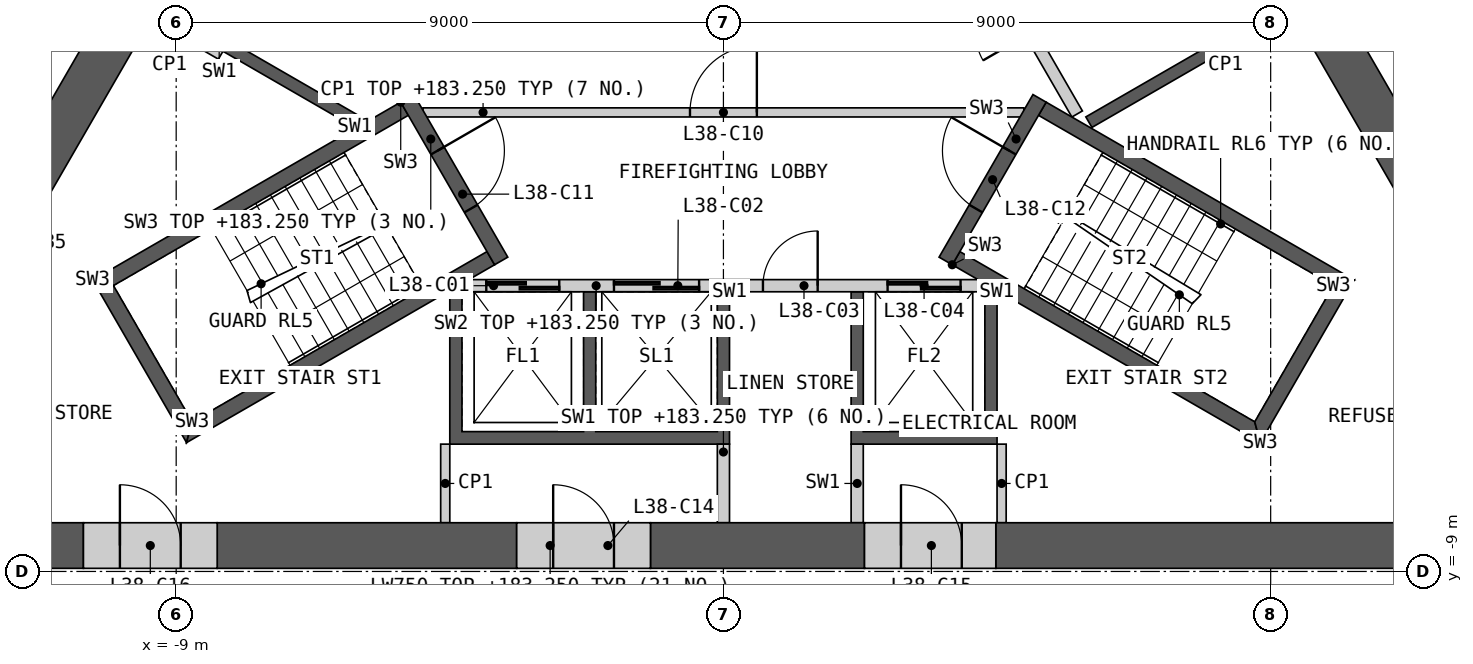
"""IFC4 building model, lengths in metres.
Left out: names, types, materials, properties, quantities, classifications, styles, units other than length and angle.
Written with IfcOpenShell. Run it as: python <this file> out.ifc"""

import sys

from ifc_helpers import new_model, si_unit, direction, frame, frame_2d, origin, place, context, subcontext, project, spatial, polyline, rectangle, outline, extrude, element, fill, save


model = new_model("IFC4")
c1 = context("Model", 3, precision=1e-05, world=origin(), true_north=direction((0.0, 1.0)))
c2 = subcontext(c1, "Body", "Model", "MODEL_VIEW")
j1 = project(units=[si_unit("LENGTHUNIT", "METRE"), si_unit("PLANEANGLEUNIT", "RADIAN")], contexts=[c1])
p1 = place(None, origin())
s1 = spatial("IfcSite", under=j1, at=p1, CompositionType="ELEMENT")
p2 = place(p1, origin())
s2 = spatial("IfcBuilding", under=s1, at=p2, CompositionType="ELEMENT")
p3 = place(p2, frame((0.0, 0.0, 180.0)))
s3 = spatial("IfcBuildingStorey", under=s2, at=p3, CompositionType="ELEMENT", Elevation=180.0)
p4 = place(p3, origin())
e1 = element("IfcWall", 1, at=p4, inside=s3, PredefinedType="SHEAR", context=c2, shape_type="SweptSolid", body=[
    extrude(outline(polyline([(4.5, -4.4), (4.5, -6.906), (2.1, -6.906), (2.1, -4.4), (2.3, -4.4), (2.3, -6.7), (4.3, -6.7), (4.3, -4.4), (4.5, -4.4)])), origin(), (0.0, 0.0, 1.0), 3.25),
])
p5 = place(p3, origin())
e2 = element("IfcWall", 2, at=p5, inside=s3, PredefinedType="SHEAR", context=c2, shape_type="SweptSolid", body=[
    extrude(outline(polyline([(0.1, -4.4), (0.1, -6.906), (-4.5, -6.906), (-4.5, -4.4), (-4.3, -4.4), (-4.3, -6.7), (-2.3, -6.7), (-2.3, -4.4), (-2.1, -4.4), (-2.1, -6.7), (-0.1, -6.7), (-0.1, -4.4), (0.1, -4.4)])), origin(), (0.0, 0.0, 1.0), 3.25),
])
p6 = place(p3, frame((-4.187, -4.3, 0.0), z_axis=(0.0, 0.0, 1.0), x_axis=(1.0, 0.0, 0.0)))
e3 = element("IfcWall", 3, at=p6, inside=s3, PredefinedType="SOLIDWALL", context=c2, shape_type="SweptSolid", body=[
    extrude(rectangle(XDim=8.373, YDim=0.2, at=frame_2d((4.187, 0.0))), origin(), (0.0, 0.0, 1.0), 3.25),
])
p7 = place(p6, frame((0.287, 0.0, 0.0)))
e4 = element("IfcOpeningElement", 4, at=p7, cuts=e3, PredefinedType="OPENING", context=c2, shape_type="SweptSolid", body=[
    extrude(rectangle(XDim=1.2, YDim=2.1, at=frame_2d((0.6, 1.05))), frame((0.0, 0.11, 0.0), z_axis=(0.0, -1.0, 0.0), x_axis=(1.0, 0.0, 0.0)), (0.0, 0.0, 1.0), 0.22),
])
p8 = place(p6, frame((2.387, 0.0, 0.0)))
e5 = element("IfcOpeningElement", 5, at=p8, cuts=e3, PredefinedType="OPENING", context=c2, shape_type="SweptSolid", body=[
    extrude(rectangle(XDim=1.4, YDim=2.1, at=frame_2d((0.7, 1.05))), frame((0.0, 0.11, 0.0), z_axis=(0.0, -1.0, 0.0), x_axis=(1.0, 0.0, 0.0)), (0.0, 0.0, 1.0), 0.22),
])
p9 = place(p6, frame((4.837, 0.0, 0.0)))
e6 = element("IfcOpeningElement", 6, at=p9, cuts=e3, PredefinedType="OPENING", context=c2, shape_type="SweptSolid", body=[
    extrude(rectangle(XDim=0.9, YDim=2.1, at=frame_2d((0.45, 1.05))), frame((0.0, 0.11, 0.0), z_axis=(0.0, -1.0, 0.0), x_axis=(1.0, 0.0, 0.0)), (0.0, 0.0, 1.0), 0.22),
])
p10 = place(p6, frame((6.887, 0.0, 0.0)))
e7 = element("IfcOpeningElement", 7, at=p10, cuts=e3, PredefinedType="OPENING", context=c2, shape_type="SweptSolid", body=[
    extrude(rectangle(XDim=1.2, YDim=2.1, at=frame_2d((0.6, 1.05))), frame((0.0, 0.11, 0.0), z_axis=(0.0, -1.0, 0.0), x_axis=(1.0, 0.0, 0.0)), (0.0, 0.0, 1.0), 0.22),
])
for number, where, z_axis, x_axis in (
    (8, (0.0, -6.906, 0.0), (0.0, 0.0, 1.0), (0.0, -1.0, 0.0)),
    (9, (2.2, -6.906, 0.0), (0.0, 0.0, 1.0), (0.0, -1.0, 0.0)),
):
    element("IfcWall", number, at=place(p3, frame(where, z_axis=z_axis, x_axis=x_axis)), inside=s3, PredefinedType="SHEAR", context=c2, shape_type="SweptSolid", body=[
        extrude(rectangle(XDim=1.293, YDim=0.2, at=frame_2d((0.646, 0.0))), origin(), (0.0, 0.0, 1.0), 3.25),
    ])
p11 = place(p3, origin())
e10 = element("IfcWall", 10, at=p11, inside=s3, PredefinedType="SHEAR", context=c2, shape_type="SweptSolid", body=[
    extrude(outline(polyline([(3.76, 2.287), (5.931, 3.54), (8.231, -0.444), (6.061, -1.697), (5.96, -1.524), (7.952, -0.374), (5.852, 3.263), (3.861, 2.113), (3.76, 2.287)])), origin(), (0.0, 0.0, 1.0), 3.25),
])
p12 = place(p3, frame((5.817, -1.476, 0.0), z_axis=(0.0, 0.0, 1.0), x_axis=(-0.500002616675, 0.866023893041, 0.0)))
e11 = element("IfcWall", 11, at=p12, inside=s3, PredefinedType="SOLIDWALL", context=c2, shape_type="SweptSolid", body=[
    extrude(rectangle(XDim=8.373, YDim=0.2, at=frame_2d((4.187, 0.0))), origin(), (0.0, 0.0, 1.0), 3.25),
])
p13 = place(p12, frame((1.537, 0.0, 0.0)))
e12 = element("IfcOpeningElement", 12, at=p13, cuts=e11, PredefinedType="OPENING", context=c2, shape_type="SweptSolid", body=[
    extrude(rectangle(XDim=0.9, YDim=2.1, at=frame_2d((0.45, 1.05))), frame((0.0, 0.11, 0.0), z_axis=(0.0, -1.0, 0.0), x_axis=(1.0, 0.0, 0.0)), (0.0, 0.0, 1.0), 0.22),
])
p14 = place(p12, frame((4.837, 0.0, 0.0)))
e13 = element("IfcOpeningElement", 13, at=p14, cuts=e11, PredefinedType="OPENING", context=c2, shape_type="SweptSolid", body=[
    extrude(rectangle(XDim=0.9, YDim=2.1, at=frame_2d((0.45, 1.05))), frame((0.0, 0.11, 0.0), z_axis=(0.0, -1.0, 0.0), x_axis=(1.0, 0.0, 0.0)), (0.0, 0.0, 1.0), 0.22),
])
p15 = place(p12, frame((6.937, 0.0, 0.0)))
e14 = element("IfcOpeningElement", 14, at=p15, cuts=e11, PredefinedType="OPENING", context=c2, shape_type="SweptSolid", body=[
    extrude(rectangle(XDim=1.1, YDim=2.1, at=frame_2d((0.55, 1.05))), frame((0.0, 0.11, 0.0), z_axis=(0.0, -1.0, 0.0), x_axis=(1.0, 0.0, 0.0)), (0.0, 0.0, 1.0), 0.22),
])
p16 = place(p3, origin())
e15 = element("IfcWall", 15, at=p16, inside=s3, PredefinedType="SHEAR", context=c2, shape_type="SweptSolid", body=[
    extrude(outline(polyline([(-6.061, -1.697), (-8.231, -0.444), (-8.131, -0.271), (-5.96, -1.524), (-6.061, -1.697)])), origin(), (0.0, 0.0, 1.0), 3.25),
])
p17 = place(p3, frame((-4.941, -1.45, 0.0), z_axis=(0.0, 0.0, 1.0), x_axis=(1.0, 0.0, 0.0)))
e16 = element("IfcWall", 16, at=p17, inside=s3, PredefinedType="PARTITIONING", context=c2, shape_type="SweptSolid", body=[
    extrude(rectangle(XDim=9.882, YDim=0.15, at=frame_2d((4.941, 0.0))), origin(), (0.0, 0.0, 1.0), 3.25),
])
p18 = place(p17, frame((4.391, 0.0, 0.0)))
e17 = element("IfcOpeningElement", 17, at=p18, cuts=e16, PredefinedType="OPENING", context=c2, shape_type="SweptSolid", body=[
    extrude(rectangle(XDim=1.1, YDim=2.1, at=frame_2d((0.55, 1.05))), frame((0.0, 0.085, 0.0), z_axis=(0.0, -1.0, 0.0), x_axis=(1.0, 0.0, 0.0)), (0.0, 0.0, 1.0), 0.17),
])
p19 = place(p3, origin())
e18 = element("IfcWall", 18, at=p19, inside=s3, PredefinedType="SHEAR", context=c2, shape_type="SweptSolid", body=[
    extrude(outline(polyline([(-5.307, -1.281), (-10.374, -4.206), (-10.032, -4.298), (-5.182, -1.498), (-5.307, -1.281)])), origin(), (0.0, 0.0, 1.0), 3.25),
])
p20 = place(p3, origin())
e19 = element("IfcWall", 19, at=p20, inside=s3, PredefinedType="SHEAR", context=c2, shape_type="SweptSolid", body=[
    extrude(outline(polyline([(-10.374, -4.206), (-8.83, -6.881), (-8.738, -6.539), (-10.032, -4.298), (-10.374, -4.206)])), origin(), (0.0, 0.0, 1.0), 3.25),
])
p21 = place(p3, origin())
e20 = element("IfcWall", 20, at=p21, inside=s3, PredefinedType="SHEAR", context=c2, shape_type="SweptSolid", body=[
    extrude(outline(polyline([(-8.738, -6.539), (-8.83, -6.881), (-3.763, -3.956), (-3.888, -3.739), (-8.738, -6.539)])), origin(), (0.0, 0.0, 1.0), 3.25),
])
p22 = place(p3, frame((-5.199, -1.219, 0.0), z_axis=(0.0, 0.0, 1.0), x_axis=(0.499982516597, -0.866035497597, 0.0)))
e21 = element("IfcWall", 21, at=p22, inside=s3, PredefinedType="SHEAR", context=c2, shape_type="SweptSolid", body=[
    extrude(rectangle(XDim=3.088, YDim=0.25, at=frame_2d((1.544, 0.0))), origin(), (0.0, 0.0, 1.0), 3.25),
])
p23 = place(p22, frame((0.994, 0.0, 0.0)))
e22 = element("IfcOpeningElement", 22, at=p23, cuts=e21, PredefinedType="OPENING", context=c2, shape_type="SweptSolid", body=[
    extrude(rectangle(XDim=1.1, YDim=2.1, at=frame_2d((0.55, 1.05))), frame((0.0, 0.135, 0.0), z_axis=(0.0, -1.0, 0.0), x_axis=(1.0, 0.0, 0.0)), (0.0, 0.0, 1.0), 0.27),
])
p24 = place(p3, origin())
e23 = element("IfcWall", 23, at=p24, inside=s3, PredefinedType="SHEAR", context=c2, shape_type="SweptSolid", body=[
    extrude(outline(polyline([(3.763, -3.956), (8.83, -6.881), (8.738, -6.539), (3.888, -3.739), (3.763, -3.956)])), origin(), (0.0, 0.0, 1.0), 3.25),
])
p25 = place(p3, origin())
e24 = element("IfcWall", 24, at=p25, inside=s3, PredefinedType="SHEAR", context=c2, shape_type="SweptSolid", body=[
    extrude(outline(polyline([(8.83, -6.881), (10.374, -4.206), (10.032, -4.298), (8.738, -6.539), (8.83, -6.881)])), origin(), (0.0, 0.0, 1.0), 3.25),
])
p26 = place(p3, origin())
e25 = element("IfcWall", 25, at=p26, inside=s3, PredefinedType="SHEAR", context=c2, shape_type="SweptSolid", body=[
    extrude(outline(polyline([(10.032, -4.298), (10.374, -4.206), (5.307, -1.281), (5.182, -1.498), (10.032, -4.298)])), origin(), (0.0, 0.0, 1.0), 3.25),
])
p27 = place(p3, frame((3.655, -3.893, 0.0), z_axis=(0.0, 0.0, 1.0), x_axis=(0.499982516597, 0.866035497597, 0.0)))
e26 = element("IfcWall", 26, at=p27, inside=s3, PredefinedType="SHEAR", context=c2, shape_type="SweptSolid", body=[
    extrude(rectangle(XDim=3.088, YDim=0.25, at=frame_2d((1.544, 0.0))), origin(), (0.0, 0.0, 1.0), 3.25),
])
p28 = place(p27, frame((0.994, 0.0, 0.0)))
e27 = element("IfcOpeningElement", 27, at=p28, cuts=e26, PredefinedType="OPENING", context=c2, shape_type="SweptSolid", body=[
    extrude(rectangle(XDim=1.1, YDim=2.1, at=frame_2d((0.55, 1.05))), frame((0.0, 0.135, 0.0), z_axis=(0.0, -1.0, 0.0), x_axis=(1.0, 0.0, 0.0)), (0.0, 0.0, 1.0), 0.27),
])
for number, where, z_axis, x_axis in (
    (28, (4.575, -6.906, 0.0), (0.0, 0.0, 1.0), (0.0, -1.0, 0.0)),
    (29, (-4.575, -6.906, 0.0), (0.0, 0.0, 1.0), (0.0, -1.0, 0.0)),
    (30, (-8.268, -0.509, 0.0), (0.0, 0.0, 1.0), (-0.866, 0.5, 0.0)),
):
    element("IfcWall", number, at=place(p3, frame(where, z_axis=z_axis, x_axis=x_axis)), inside=s3, PredefinedType="PARTITIONING", context=c2, shape_type="SweptSolid", body=[
        extrude(rectangle(XDim=1.293, YDim=0.15, at=frame_2d((0.646, 0.0))), origin(), (0.0, 0.0, 1.0), 3.25),
    ])
p29 = place(p3, frame((4.48, -8.574, 0.0), z_axis=(0.0, 0.0, 1.0), x_axis=(1.0, 0.0, 0.0)))
e31 = element("IfcWall", 31, at=p29, inside=s3, PredefinedType="SHEAR", context=c2, shape_type="SweptSolid", body=[
    extrude(rectangle(XDim=9.721, YDim=0.75, at=frame_2d((4.86, 0.0))), origin(), (0.0, 0.0, 1.0), 3.25),
])
p30 = place(p3, frame((-8.325, -8.574, 0.0), z_axis=(0.0, 0.0, 1.0), x_axis=(1.0, 0.0, 0.0)))
e32 = element("IfcWall", 32, at=p30, inside=s3, PredefinedType="SHEAR", context=c2, shape_type="SweptSolid", body=[
    extrude(rectangle(XDim=4.926, YDim=0.75, at=frame_2d((2.463, 0.0))), origin(), (0.0, 0.0, 1.0), 3.25),
])
p31 = place(p3, frame((-14.201, -8.574, 0.0), z_axis=(0.0, 0.0, 1.0), x_axis=(1.0, 0.0, 0.0)))
e33 = element("IfcWall", 33, at=p31, inside=s3, PredefinedType="SHEAR", context=c2, shape_type="SweptSolid", body=[
    extrude(rectangle(XDim=3.676, YDim=0.75, at=frame_2d((1.838, 0.0))), origin(), (0.0, 0.0, 1.0), 3.25),
])
p32 = place(p3, frame((-1.2, -8.574, 0.0), z_axis=(0.0, 0.0, 1.0), x_axis=(1.0, 0.0, 0.0)))
e34 = element("IfcWall", 34, at=p32, inside=s3, PredefinedType="SHEAR", context=c2, shape_type="SweptSolid", body=[
    extrude(rectangle(XDim=3.52, YDim=0.75, at=frame_2d((1.76, 0.0))), origin(), (0.0, 0.0, 1.0), 3.25),
])
p33 = place(p3, frame((11.527, -2.817, 0.0), z_axis=(0.0, 0.0, 1.0), x_axis=(-0.50001992892, 0.866013897511, 0.0)))
e35 = element("IfcWall", 35, at=p33, inside=s3, PredefinedType="SHEAR", context=c2, shape_type="SweptSolid", body=[
    extrude(rectangle(XDim=4.926, YDim=0.75, at=frame_2d((2.463, 0.0))), origin(), (0.0, 0.0, 1.0), 3.25),
])
p34 = place(p3, frame((-9.625, 0.477, 0.0), z_axis=(0.0, 0.0, 1.0), x_axis=(-0.499986234705, -0.866033351035, 0.0)))
e36 = element("IfcWall", 36, at=p34, inside=s3, PredefinedType="SHEAR", context=c2, shape_type="SweptSolid", body=[
    extrude(rectangle(XDim=9.801, YDim=0.75, at=frame_2d((4.9, 0.0))), origin(), (0.0, 0.0, 1.0), 3.25),
])
p35 = place(p3, frame((-3.4, -8.574, 0.0), z_axis=(0.0, 0.0, 1.0), x_axis=(1.0, 0.0, 0.0)))
e37 = element("IfcWall", 37, at=p35, inside=s3, PredefinedType="SHEAR", context=c2, shape_type="SweptSolid", body=[
    extrude(rectangle(XDim=2.2, YDim=0.75, at=frame_2d((1.1, 0.0))), origin(), (0.0, 0.0, 1.0), 3.25),
])
p36 = place(p35, frame((0.6, 0.0, 0.0)))
e38 = element("IfcOpeningElement", 38, at=p36, cuts=e37, PredefinedType="OPENING", context=c2, shape_type="SweptSolid", body=[
    extrude(rectangle(XDim=1.0, YDim=2.1, at=frame_2d((0.5, 1.05))), frame((0.0, 0.385, 0.0), z_axis=(0.0, -1.0, 0.0), x_axis=(1.0, 0.0, 0.0)), (0.0, 0.0, 1.0), 0.77),
])
p37 = place(p3, frame((2.32, -8.574, 0.0), z_axis=(0.0, 0.0, 1.0), x_axis=(1.0, 0.0, 0.0)))
e39 = element("IfcWall", 39, at=p37, inside=s3, PredefinedType="SHEAR", context=c2, shape_type="SweptSolid", body=[
    extrude(rectangle(XDim=2.16, YDim=0.75, at=frame_2d((1.08, 0.0))), origin(), (0.0, 0.0, 1.0), 3.25),
])
p38 = place(p37, frame((0.6, 0.0, 0.0)))
e40 = element("IfcOpeningElement", 40, at=p38, cuts=e39, PredefinedType="OPENING", context=c2, shape_type="SweptSolid", body=[
    extrude(rectangle(XDim=1.0, YDim=2.1, at=frame_2d((0.5, 1.05))), frame((0.0, 0.385, 0.0), z_axis=(0.0, -1.0, 0.0), x_axis=(1.0, 0.0, 0.0)), (0.0, 0.0, 1.0), 0.77),
])
p39 = place(p3, frame((-10.525, -8.574, 0.0), z_axis=(0.0, 0.0, 1.0), x_axis=(1.0, 0.0, 0.0)))
e41 = element("IfcWall", 41, at=p39, inside=s3, PredefinedType="SHEAR", context=c2, shape_type="SweptSolid", body=[
    extrude(rectangle(XDim=2.2, YDim=0.75, at=frame_2d((1.1, 0.0))), origin(), (0.0, 0.0, 1.0), 3.25),
])
p40 = place(p39, frame((0.6, 0.0, 0.0)))
e42 = element("IfcOpeningElement", 42, at=p40, cuts=e41, PredefinedType="OPENING", context=c2, shape_type="SweptSolid", body=[
    extrude(rectangle(XDim=1.0, YDim=2.1, at=frame_2d((0.5, 1.05))), frame((0.0, 0.385, 0.0), z_axis=(0.0, -1.0, 0.0), x_axis=(1.0, 0.0, 0.0)), (0.0, 0.0, 1.0), 0.77),
])
p41 = place(p3, frame((5.377, 19.385, 0.0), z_axis=(0.0, 0.0, 1.0), x_axis=(0.500000757641, -0.86602496636, 0.0)))
e43 = element("IfcWall", 43, at=p41, inside=s3, PredefinedType="PARTITIONING", context=c2, shape_type="SweptSolid", body=[
    extrude(rectangle(XDim=28.198, YDim=0.2, at=frame_2d((14.099, 0.0))), origin(), (0.0, 0.0, 1.0), 3.25),
])
p42 = place(p41, frame((22.735, 0.0, 0.0)))
e44 = element("IfcOpeningElement", 44, at=p42, cuts=e43, PredefinedType="OPENING", context=c2, shape_type="SweptSolid", body=[
    extrude(rectangle(XDim=1.8, YDim=2.1, at=frame_2d((0.9, 1.05))), frame((0.0, 0.11, 0.0), z_axis=(0.0, -1.0, 0.0), x_axis=(1.0, 0.0, 0.0)), (0.0, 0.0, 1.0), 0.22),
])
p43 = place(p41, frame((14.402, 0.0, 0.0)))
e45 = element("IfcOpeningElement", 45, at=p43, cuts=e43, PredefinedType="OPENING", context=c2, shape_type="SweptSolid", body=[
    extrude(rectangle(XDim=1.0, YDim=2.1, at=frame_2d((0.5, 1.05))), frame((0.0, 0.11, 0.0), z_axis=(0.0, -1.0, 0.0), x_axis=(1.0, 0.0, 0.0)), (0.0, 0.0, 1.0), 0.22),
])
p44 = place(p41, frame((12.796, 0.0, 0.0)))
e46 = element("IfcOpeningElement", 46, at=p44, cuts=e43, PredefinedType="OPENING", context=c2, shape_type="SweptSolid", body=[
    extrude(rectangle(XDim=1.0, YDim=2.1, at=frame_2d((0.5, 1.05))), frame((0.0, 0.11, 0.0), z_axis=(0.0, -1.0, 0.0), x_axis=(1.0, 0.0, 0.0)), (0.0, 0.0, 1.0), 0.22),
])
p45 = place(p41, frame((4.164, 0.0, 0.0)))
e47 = element("IfcOpeningElement", 47, at=p45, cuts=e43, PredefinedType="OPENING", context=c2, shape_type="SweptSolid", body=[
    extrude(rectangle(XDim=1.0, YDim=2.1, at=frame_2d((0.5, 1.05))), frame((0.0, 0.11, 0.0), z_axis=(0.0, -1.0, 0.0), x_axis=(1.0, 0.0, 0.0)), (0.0, 0.0, 1.0), 0.22),
])
p46 = place(p41, frame((1.452, 0.0, 0.0)))
e48 = element("IfcOpeningElement", 48, at=p46, cuts=e43, PredefinedType="OPENING", context=c2, shape_type="SweptSolid", body=[
    extrude(rectangle(XDim=0.95, YDim=2.1, at=frame_2d((0.475, 1.05))), frame((0.0, 0.11, 0.0), z_axis=(0.0, -1.0, 0.0), x_axis=(1.0, 0.0, 0.0)), (0.0, 0.0, 1.0), 0.22),
])
p47 = place(p3, frame((-14.619, -2.624, 0.0), z_axis=(0.0, 0.0, 1.0), x_axis=(0.50000393355, 0.866023132736, 0.0)))
e49 = element("IfcWall", 49, at=p47, inside=s3, PredefinedType="PARTITIONING", context=c2, shape_type="SweptSolid", body=[
    extrude(rectangle(XDim=9.335, YDim=0.2, at=frame_2d((4.667, 0.0))), origin(), (0.0, 0.0, 1.0), 3.25),
])
p48 = place(p47, frame((4.77, 0.0, 0.0)))
e50 = element("IfcOpeningElement", 50, at=p48, cuts=e49, PredefinedType="OPENING", context=c2, shape_type="SweptSolid", body=[
    extrude(rectangle(XDim=1.0, YDim=2.1, at=frame_2d((0.5, 1.05))), frame((0.0, 0.11, 0.0), z_axis=(0.0, -1.0, 0.0), x_axis=(1.0, 0.0, 0.0)), (0.0, 0.0, 1.0), 0.22),
])
p49 = place(p47, frame((3.163, 0.0, 0.0)))
e51 = element("IfcOpeningElement", 51, at=p49, cuts=e49, PredefinedType="OPENING", context=c2, shape_type="SweptSolid", body=[
    extrude(rectangle(XDim=1.0, YDim=2.1, at=frame_2d((0.5, 1.05))), frame((0.0, 0.11, 0.0), z_axis=(0.0, -1.0, 0.0), x_axis=(1.0, 0.0, 0.0)), (0.0, 0.0, 1.0), 0.22),
])
p50 = place(p7, origin())
e52 = element("IfcDoor", 52, at=p50, inside=s3, OperationType="SLIDING_TO_LEFT", PredefinedType="DOOR", context=c2, shape_type="SweptSolid", body=[
    extrude(rectangle(XDim=1.2, YDim=2.1, at=frame_2d((0.6, 1.05))), frame((0.0, 0.025, 0.0), z_axis=(0.0, -1.0, 0.0), x_axis=(1.0, 0.0, 0.0)), (0.0, 0.0, 1.0), 0.05),
])
fill(e4, e52)
p51 = place(p8, origin())
e53 = element("IfcDoor", 53, at=p51, inside=s3, OperationType="SLIDING_TO_LEFT", PredefinedType="DOOR", context=c2, shape_type="SweptSolid", body=[
    extrude(rectangle(XDim=1.4, YDim=2.1, at=frame_2d((0.7, 1.05))), frame((0.0, 0.025, 0.0), z_axis=(0.0, -1.0, 0.0), x_axis=(1.0, 0.0, 0.0)), (0.0, 0.0, 1.0), 0.05),
])
fill(e5, e53)
p52 = place(p9, origin())
e54 = element("IfcDoor", 54, at=p52, inside=s3, OperationType="SINGLE_SWING_RIGHT", PredefinedType="DOOR", context=c2, shape_type="SweptSolid", body=[
    extrude(rectangle(XDim=0.9, YDim=2.1, at=frame_2d((0.45, 1.05))), frame((0.0, 0.025, 0.0), z_axis=(0.0, -1.0, 0.0), x_axis=(1.0, 0.0, 0.0)), (0.0, 0.0, 1.0), 0.05),
])
fill(e6, e54)
p53 = place(p10, origin())
e55 = element("IfcDoor", 55, at=p53, inside=s3, OperationType="SLIDING_TO_LEFT", PredefinedType="DOOR", context=c2, shape_type="SweptSolid", body=[
    extrude(rectangle(XDim=1.2, YDim=2.1, at=frame_2d((0.6, 1.05))), frame((0.0, 0.025, 0.0), z_axis=(0.0, -1.0, 0.0), x_axis=(1.0, 0.0, 0.0)), (0.0, 0.0, 1.0), 0.05),
])
fill(e7, e55)
p54 = place(p18, origin())
e56 = element("IfcDoor", 56, at=p54, inside=s3, OperationType="SINGLE_SWING_RIGHT", PredefinedType="DOOR", context=c2, shape_type="SweptSolid", body=[
    extrude(rectangle(XDim=1.1, YDim=2.1, at=frame_2d((0.55, 1.05))), frame((0.0, 0.025, 0.0), z_axis=(0.0, -1.0, 0.0), x_axis=(1.0, 0.0, 0.0)), (0.0, 0.0, 1.0), 0.05),
])
fill(e17, e56)
p55 = place(p23, origin())
e57 = element("IfcDoor", 57, at=p55, inside=s3, OperationType="SINGLE_SWING_LEFT", PredefinedType="DOOR", context=c2, shape_type="SweptSolid", body=[
    extrude(rectangle(XDim=1.1, YDim=2.1, at=frame_2d((0.55, 1.05))), frame((0.0, 0.025, 0.0), z_axis=(0.0, -1.0, 0.0), x_axis=(1.0, 0.0, 0.0)), (0.0, 0.0, 1.0), 0.05),
])
fill(e22, e57)
p56 = place(p28, origin())
e58 = element("IfcDoor", 58, at=p56, inside=s3, OperationType="SINGLE_SWING_RIGHT", PredefinedType="DOOR", context=c2, shape_type="SweptSolid", body=[
    extrude(rectangle(XDim=1.1, YDim=2.1, at=frame_2d((0.55, 1.05))), frame((0.0, 0.025, 0.0), z_axis=(0.0, -1.0, 0.0), x_axis=(1.0, 0.0, 0.0)), (0.0, 0.0, 1.0), 0.05),
])
fill(e27, e58)
p57 = place(p36, origin())
e59 = element("IfcDoor", 59, at=p57, inside=s3, OperationType="SINGLE_SWING_LEFT", PredefinedType="DOOR", context=c2, shape_type="SweptSolid", body=[
    extrude(rectangle(XDim=1.0, YDim=2.1, at=frame_2d((0.5, 1.05))), frame((0.0, 0.13, 0.0), z_axis=(0.0, -1.0, 0.0), x_axis=(1.0, 0.0, 0.0)), (0.0, 0.0, 1.0), 0.05),
])
fill(e38, e59)
p58 = place(p38, origin())
e60 = element("IfcDoor", 60, at=p58, inside=s3, OperationType="SINGLE_SWING_LEFT", PredefinedType="DOOR", context=c2, shape_type="SweptSolid", body=[
    extrude(rectangle(XDim=1.0, YDim=2.1, at=frame_2d((0.5, 1.05))), frame((0.0, 0.13, 0.0), z_axis=(0.0, -1.0, 0.0), x_axis=(1.0, 0.0, 0.0)), (0.0, 0.0, 1.0), 0.05),
])
fill(e40, e60)
p59 = place(p40, origin())
e61 = element("IfcDoor", 61, at=p59, inside=s3, OperationType="SINGLE_SWING_LEFT", PredefinedType="DOOR", context=c2, shape_type="SweptSolid", body=[
    extrude(rectangle(XDim=1.0, YDim=2.1, at=frame_2d((0.5, 1.05))), frame((0.0, 0.13, 0.0), z_axis=(0.0, -1.0, 0.0), x_axis=(1.0, 0.0, 0.0)), (0.0, 0.0, 1.0), 0.05),
])
fill(e42, e61)
save(model, sys.argv[1])
